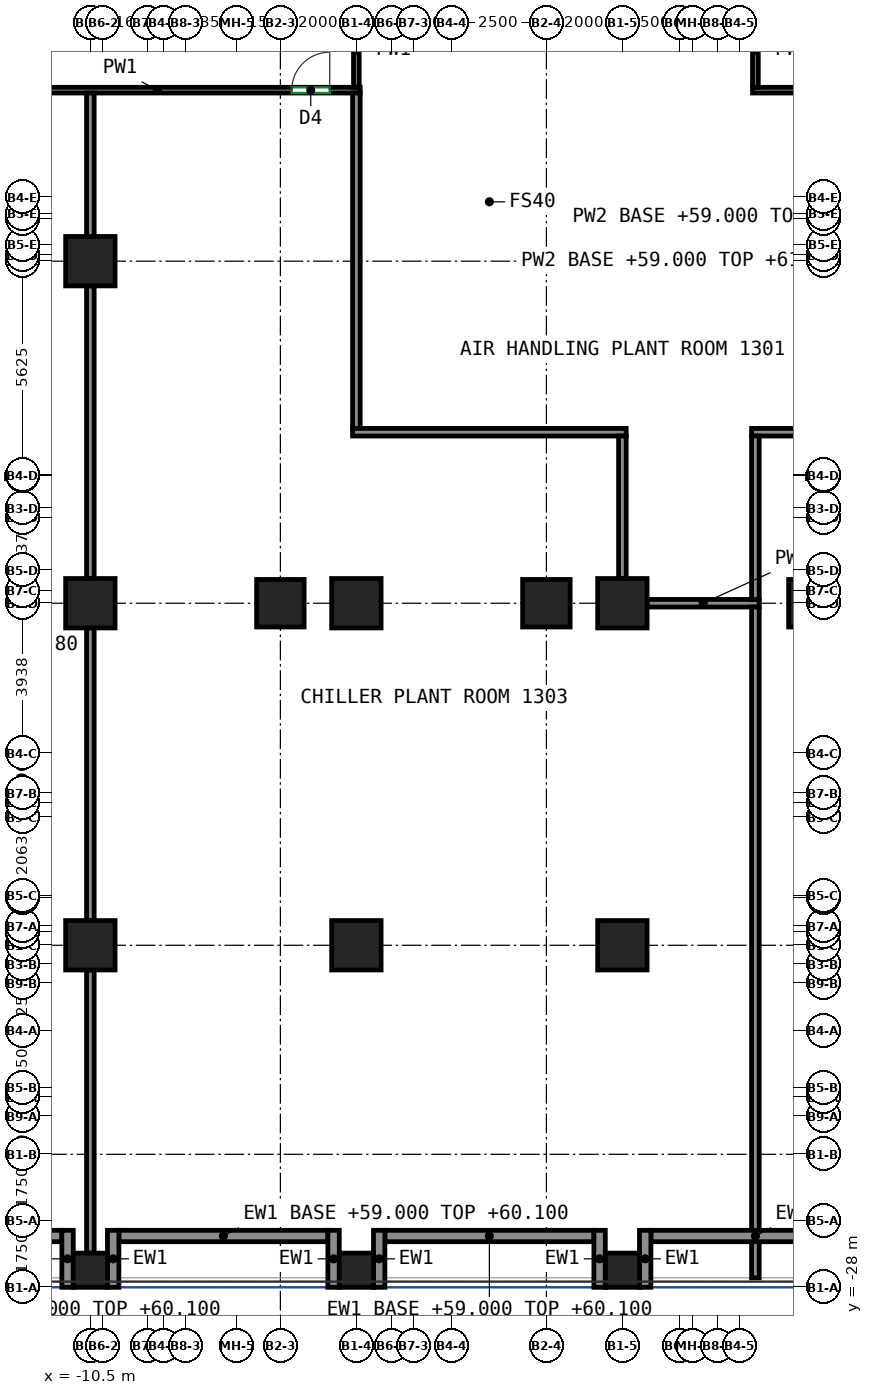
"""IFC4 building model, lengths in metres.
Left out: names, types, materials, properties, quantities, classifications, styles, units other than length and angle.
Written with IfcOpenShell. Run it as: python <this file> out.ifc"""

import sys

from ifc_helpers import new_model, si_unit, direction, frame, frame_2d, origin, origin_2d, place, context, subcontext, project, spatial, rectangle, extrude, source, transform, mapped, element, fill, save


model = new_model("IFC4")
c1 = context("Model", 3, precision=1e-05, world=origin(), true_north=direction((0.0, 1.0)))
c2 = subcontext(c1, "Body", "Model", "MODEL_VIEW")
j1 = project(units=[si_unit("LENGTHUNIT", "METRE"), si_unit("PLANEANGLEUNIT", "RADIAN")], contexts=[c1])
p1 = place(None, origin())
s1 = spatial("IfcSite", under=j1, at=p1, CompositionType="ELEMENT")
p2 = place(p1, origin())
s2 = spatial("IfcBuilding", under=s1, at=p2, CompositionType="ELEMENT")
p3 = place(p2, frame((0.0, 0.0, 59.0)))
s3 = spatial("IfcBuildingStorey", under=s2, at=p3, CompositionType="ELEMENT", Elevation=59.0)
m1 = source(origin(), c2, "Body", "SweptSolid", [
    extrude(rectangle(XDim=0.9, YDim=0.9, at=origin_2d()), origin(), (0.0, 0.0, 1.0), 2.3),
])
p4 = place(p3, frame((-10.5, -27.55, 0.0), z_axis=(0.0, 0.0, 1.0), x_axis=(1.0, 0.0, 0.0)))
e1 = element("IfcColumn", 1, at=p4, inside=s3, PredefinedType="COLUMN", context=c2, shape_type="MappedRepresentation", body=[
    mapped(m1, transform((0.0, 0.0, 0.0))),
])
m2 = source(origin(), c2, "Body", "SweptSolid", [
    extrude(rectangle(XDim=1.3, YDim=1.3, at=origin_2d()), origin(), (0.0, 0.0, 1.0), 2.3),
])
for number, where, z_axis, x_axis in (
    (2, (-10.5, -19.0, 0.0), (0.0, 0.0, 1.0), (1.0, 0.0, 0.0)),
    (3, (-10.5, -10.0, 0.0), (0.0, 0.0, 1.0), (1.0, 0.0, 0.0)),
    (4, (-10.5, -1.0, 0.0), (0.0, 0.0, 1.0), (1.0, 0.0, 0.0)),
):
    element("IfcColumn", number, at=place(p3, frame(where, z_axis=z_axis, x_axis=x_axis)), inside=s3, PredefinedType="COLUMN", context=c2, shape_type="MappedRepresentation", body=[
        mapped(m2, transform((0.0, 0.0, 0.0))),
    ])
p5 = place(p3, frame((-3.5, -27.55, 0.0), z_axis=(0.0, 0.0, 1.0), x_axis=(1.0, 0.0, 0.0)))
e5 = element("IfcColumn", 5, at=p5, inside=s3, PredefinedType="COLUMN", context=c2, shape_type="MappedRepresentation", body=[
    mapped(m1, transform((0.0, 0.0, 0.0))),
])
for number, where, z_axis, x_axis in (
    (6, (-3.5, -19.0, 0.0), (0.0, 0.0, 1.0), (1.0, 0.0, 0.0)),
    (7, (-3.5, -10.0, 0.0), (0.0, 0.0, 1.0), (1.0, 0.0, 0.0)),
):
    element("IfcColumn", number, at=place(p3, frame(where, z_axis=z_axis, x_axis=x_axis)), inside=s3, PredefinedType="COLUMN", context=c2, shape_type="MappedRepresentation", body=[
        mapped(m2, transform((0.0, 0.0, 0.0))),
    ])
p6 = place(p3, frame((3.5, -27.55, 0.0), z_axis=(0.0, 0.0, 1.0), x_axis=(1.0, 0.0, 0.0)))
e8 = element("IfcColumn", 8, at=p6, inside=s3, PredefinedType="COLUMN", context=c2, shape_type="MappedRepresentation", body=[
    mapped(m1, transform((0.0, 0.0, 0.0))),
])
for number, where, z_axis, x_axis in (
    (9, (3.5, -19.0, 0.0), (0.0, 0.0, 1.0), (1.0, 0.0, 0.0)),
    (10, (3.5, -10.0, 0.0), (0.0, 0.0, 1.0), (1.0, 0.0, 0.0)),
):
    element("IfcColumn", number, at=place(p3, frame(where, z_axis=z_axis, x_axis=x_axis)), inside=s3, PredefinedType="COLUMN", context=c2, shape_type="MappedRepresentation", body=[
        mapped(m2, transform((0.0, 0.0, 0.0))),
    ])
m3 = source(origin(), c2, "Body", "SweptSolid", [
    extrude(rectangle(XDim=1.25, YDim=1.25, at=origin_2d()), origin(), (0.0, 0.0, 1.0), 3.8),
])
for number, where, z_axis, x_axis in (
    (11, (-5.5, -10.0, 0.0), (0.0, 0.0, 1.0), (1.0, 0.0, 0.0)),
    (12, (1.5, -10.0, 0.0), (0.0, 0.0, 1.0), (1.0, 0.0, 0.0)),
    (13, (8.5, -10.0, 0.0), (0.0, 0.0, 1.0), (1.0, 0.0, 0.0)),
):
    element("IfcColumn", number, at=place(p3, frame(where, z_axis=z_axis, x_axis=x_axis)), inside=s3, PredefinedType="COLUMN", context=c2, shape_type="MappedRepresentation", body=[
        mapped(m3, transform((0.0, 0.0, 0.0))),
    ])
m4 = source(origin(), c2, "Body", "SweptSolid", [
    extrude(rectangle(XDim=5.5, YDim=0.3, at=frame_2d((2.75, 0.0))), origin(), (0.0, 0.0, 1.0), 1.1),
])
p7 = place(p3, frame((-16.75, -26.65, 0.0), z_axis=(0.0, 0.0, 1.0), x_axis=(1.0, 0.0, 0.0)))
e14 = element("IfcWall", 14, at=p7, inside=s3, PredefinedType="SOLIDWALL", context=c2, shape_type="MappedRepresentation", body=[
    mapped(m4, transform((0.0, 0.0, 0.0))),
])
m5 = source(origin(), c2, "Body", "SweptSolid", [
    extrude(rectangle(XDim=1.5, YDim=0.3, at=frame_2d((0.75, 0.0))), origin(), (0.0, 0.0, 1.0), 2.3),
])
p8 = place(p3, frame((-11.1, -28.0, 0.0), z_axis=(0.0, 0.0, 1.0), x_axis=(0.0, 1.0, 0.0)))
e15 = element("IfcWall", 15, at=p8, inside=s3, PredefinedType="SOLIDWALL", context=c2, shape_type="MappedRepresentation", body=[
    mapped(m5, transform((0.0, 0.0, 0.0))),
])
p9 = place(p3, frame((-9.75, -26.65, 0.0), z_axis=(0.0, 0.0, 1.0), x_axis=(1.0, 0.0, 0.0)))
e16 = element("IfcWall", 16, at=p9, inside=s3, PredefinedType="SOLIDWALL", context=c2, shape_type="MappedRepresentation", body=[
    mapped(m4, transform((0.0, 0.0, 0.0))),
])
for number, where, z_axis, x_axis in (
    (17, (-9.9, -28.0, 0.0), (0.0, 0.0, 1.0), (0.0, 1.0, 0.0)),
    (18, (-4.1, -28.0, 0.0), (0.0, 0.0, 1.0), (0.0, 1.0, 0.0)),
):
    element("IfcWall", number, at=place(p3, frame(where, z_axis=z_axis, x_axis=x_axis)), inside=s3, PredefinedType="SOLIDWALL", context=c2, shape_type="MappedRepresentation", body=[
        mapped(m5, transform((0.0, 0.0, 0.0))),
    ])
p10 = place(p3, frame((-2.75, -26.65, 0.0), z_axis=(0.0, 0.0, 1.0), x_axis=(1.0, 0.0, 0.0)))
e19 = element("IfcWall", 19, at=p10, inside=s3, PredefinedType="SOLIDWALL", context=c2, shape_type="MappedRepresentation", body=[
    mapped(m4, transform((0.0, 0.0, 0.0))),
])
for number, where, z_axis, x_axis in (
    (20, (-2.9, -28.0, 0.0), (0.0, 0.0, 1.0), (0.0, 1.0, 0.0)),
    (21, (2.9, -28.0, 0.0), (0.0, 0.0, 1.0), (0.0, 1.0, 0.0)),
):
    element("IfcWall", number, at=place(p3, frame(where, z_axis=z_axis, x_axis=x_axis)), inside=s3, PredefinedType="SOLIDWALL", context=c2, shape_type="MappedRepresentation", body=[
        mapped(m5, transform((0.0, 0.0, 0.0))),
    ])
p11 = place(p3, frame((4.25, -26.65, 0.0), z_axis=(0.0, 0.0, 1.0), x_axis=(1.0, 0.0, 0.0)))
e22 = element("IfcWall", 22, at=p11, inside=s3, PredefinedType="SOLIDWALL", context=c2, shape_type="MappedRepresentation", body=[
    mapped(m4, transform((0.0, 0.0, 0.0))),
])
p12 = place(p3, frame((4.1, -28.0, 0.0), z_axis=(0.0, 0.0, 1.0), x_axis=(0.0, 1.0, 0.0)))
e23 = element("IfcWall", 23, at=p12, inside=s3, PredefinedType="SOLIDWALL", context=c2, shape_type="MappedRepresentation", body=[
    mapped(m5, transform((0.0, 0.0, 0.0))),
])
p13 = place(p3, frame((-14.075, 3.5, 0.0), z_axis=(0.0, 0.0, 1.0), x_axis=(1.0, 0.0, 0.0)))
e24 = element("IfcWall", 24, at=p13, inside=s3, PredefinedType="PARTITIONING", context=c2, shape_type="SweptSolid", body=[
    extrude(rectangle(XDim=10.675, YDim=0.15, at=frame_2d((5.337, 0.0))), origin(), (0.0, 0.0, 1.0), 3.8),
])
p14 = place(p13, frame((8.874, 0.0, 0.0)))
e25 = element("IfcOpeningElement", 25, at=p14, cuts=e24, PredefinedType="OPENING", context=c2, shape_type="SweptSolid", body=[
    extrude(rectangle(XDim=1.0, YDim=2.1, at=frame_2d((0.5, 1.05))), frame((0.0, 0.085, 0.0), z_axis=(0.0, -1.0, 0.0), x_axis=(1.0, 0.0, 0.0)), (0.0, 0.0, 1.0), 0.17),
])
p15 = place(p3, frame((6.925, 3.5, 0.0), z_axis=(0.0, 0.0, 1.0), x_axis=(1.0, 0.0, 0.0)))
e26 = element("IfcWall", 26, at=p15, inside=s3, PredefinedType="PARTITIONING", context=c2, shape_type="SweptSolid", body=[
    extrude(rectangle(XDim=10.575, YDim=0.15, at=frame_2d((5.288, 0.0))), origin(), (0.0, 0.0, 1.0), 3.8),
])
p16 = place(p15, frame((8.772, 0.0, 0.0)))
e27 = element("IfcOpeningElement", 27, at=p16, cuts=e26, PredefinedType="OPENING", context=c2, shape_type="SweptSolid", body=[
    extrude(rectangle(XDim=1.0, YDim=2.1, at=frame_2d((0.5, 1.05))), frame((0.0, 0.085, 0.0), z_axis=(0.0, -1.0, 0.0), x_axis=(1.0, 0.0, 0.0)), (0.0, 0.0, 1.0), 0.17),
])
for number, where, z_axis, x_axis in (
    (28, (7.0, 5.525, 0.0), (0.0, 0.0, 1.0), (0.0, -1.0, 0.0)),
    (29, (-3.5, 3.575, 0.0), (0.0, 0.0, 1.0), (0.0, 1.0, 0.0)),
):
    element("IfcWall", number, at=place(p3, frame(where, z_axis=z_axis, x_axis=x_axis)), inside=s3, PredefinedType="PARTITIONING", context=c2, shape_type="SweptSolid", body=[
        extrude(rectangle(XDim=1.95, YDim=0.15, at=frame_2d((0.975, 0.0))), origin(), (0.0, 0.0, 1.0), 3.8),
    ])
p17 = place(p3, frame((-10.5, -0.35, 0.0), z_axis=(0.0, 0.0, 1.0), x_axis=(0.0, 1.0, 0.0)))
e30 = element("IfcWall", 30, at=p17, inside=s3, PredefinedType="PARTITIONING", context=c2, shape_type="SweptSolid", body=[
    extrude(rectangle(XDim=3.774, YDim=0.2, at=frame_2d((1.887, 0.0))), origin(), (0.0, 0.0, 1.0), 3.8),
])
for number, where, z_axis, x_axis in (
    (31, (-10.5, -9.35, 0.0), (0.0, 0.0, 1.0), (0.0, 1.0, 0.0)),
    (32, (-10.5, -18.35, 0.0), (0.0, 0.0, 1.0), (0.0, 1.0, 0.0)),
):
    element("IfcWall", number, at=place(p3, frame(where, z_axis=z_axis, x_axis=x_axis)), inside=s3, PredefinedType="PARTITIONING", context=c2, shape_type="SweptSolid", body=[
        extrude(rectangle(XDim=7.7, YDim=0.2, at=frame_2d((3.85, 0.0))), origin(), (0.0, 0.0, 1.0), 3.8),
    ])
p18 = place(p3, frame((-10.5, -27.1, 0.0), z_axis=(0.0, 0.0, 1.0), x_axis=(0.0, 1.0, 0.0)))
e33 = element("IfcWall", 33, at=p18, inside=s3, PredefinedType="PARTITIONING", context=c2, shape_type="SweptSolid", body=[
    extrude(rectangle(XDim=7.45, YDim=0.2, at=frame_2d((3.725, 0.0))), origin(), (0.0, 0.0, 1.0), 3.8),
])
p19 = place(p3, frame((4.15, -10.0, 0.0), z_axis=(0.0, 0.0, 1.0), x_axis=(1.0, 0.0, 0.0)))
e34 = element("IfcWall", 34, at=p19, inside=s3, PredefinedType="PARTITIONING", context=c2, shape_type="SweptSolid", body=[
    extrude(rectangle(XDim=2.95, YDim=0.2, at=frame_2d((1.475, 0.0))), origin(), (0.0, 0.0, 1.0), 2.3),
])
p20 = place(p3, frame((-3.5, -5.4, 0.0), z_axis=(0.0, 0.0, 1.0), x_axis=(0.0, 1.0, 0.0)))
e35 = element("IfcWall", 35, at=p20, inside=s3, PredefinedType="PARTITIONING", context=c2, shape_type="SweptSolid", body=[
    extrude(rectangle(XDim=8.824, YDim=0.2, at=frame_2d((4.412, 0.0))), origin(), (0.0, 0.0, 1.0), 3.8),
])
p21 = place(p3, frame((-3.6, -5.5, 0.0), z_axis=(0.0, 0.0, 1.0), x_axis=(1.0, 0.0, 0.0)))
e36 = element("IfcWall", 36, at=p21, inside=s3, PredefinedType="PARTITIONING", context=c2, shape_type="SweptSolid", body=[
    extrude(rectangle(XDim=7.2, YDim=0.2, at=frame_2d((3.6, 0.0))), origin(), (0.0, 0.0, 1.0), 3.8),
])
p22 = place(p3, frame((3.5, -9.35, 0.0), z_axis=(0.0, 0.0, 1.0), x_axis=(0.0, 1.0, 0.0)))
e37 = element("IfcWall", 37, at=p22, inside=s3, PredefinedType="PARTITIONING", context=c2, shape_type="SweptSolid", body=[
    extrude(rectangle(XDim=3.75, YDim=0.2, at=frame_2d((1.875, 0.0))), origin(), (0.0, 0.0, 1.0), 3.8),
])
p23 = place(p3, frame((7.0, -27.75, 0.0), z_axis=(0.0, 0.0, 1.0), x_axis=(0.0, 1.0, 0.0)))
e38 = element("IfcWall", 38, at=p23, inside=s3, PredefinedType="PARTITIONING", context=c2, shape_type="SweptSolid", body=[
    extrude(rectangle(XDim=0.98, YDim=0.2, at=frame_2d((0.49, 0.0))), origin(), (0.0, 0.0, 1.0), 3.8),
])
p24 = place(p3, frame((7.0, -26.53, 0.0), z_axis=(0.0, 0.0, 1.0), x_axis=(0.0, 1.0, 0.0)))
e39 = element("IfcWall", 39, at=p24, inside=s3, PredefinedType="PARTITIONING", context=c2, shape_type="SweptSolid", body=[
    extrude(rectangle(XDim=16.43, YDim=0.2, at=frame_2d((8.215, 0.0))), origin(), (0.0, 0.0, 1.0), 3.8),
])
p25 = place(p3, frame((6.9, -5.5, 0.0), z_axis=(0.0, 0.0, 1.0), x_axis=(1.0, 0.0, 0.0)))
e40 = element("IfcWall", 40, at=p25, inside=s3, PredefinedType="PARTITIONING", context=c2, shape_type="SweptSolid", body=[
    extrude(rectangle(XDim=3.7, YDim=0.2, at=frame_2d((1.85, 0.0))), origin(), (0.0, 0.0, 1.0), 3.8),
])
p26 = place(p3, frame((7.0, -9.9, 0.0), z_axis=(0.0, 0.0, 1.0), x_axis=(0.0, 1.0, 0.0)))
e41 = element("IfcWall", 41, at=p26, inside=s3, PredefinedType="PARTITIONING", context=c2, shape_type="SweptSolid", body=[
    extrude(rectangle(XDim=4.3, YDim=0.2, at=frame_2d((2.15, 0.0))), origin(), (0.0, 0.0, 1.0), 3.8),
])
p27 = place(p14, origin())
e42 = element("IfcDoor", 42, at=p27, inside=s3, OperationType="SINGLE_SWING_RIGHT", PredefinedType="DOOR", context=c2, shape_type="SweptSolid", body=[
    extrude(rectangle(XDim=1.0, YDim=2.1, at=frame_2d((0.5, 1.05))), frame((0.0, 0.025, 0.0), z_axis=(0.0, -1.0, 0.0), x_axis=(1.0, 0.0, 0.0)), (0.0, 0.0, 1.0), 0.05),
])
fill(e25, e42)
save(model, sys.argv[1])
